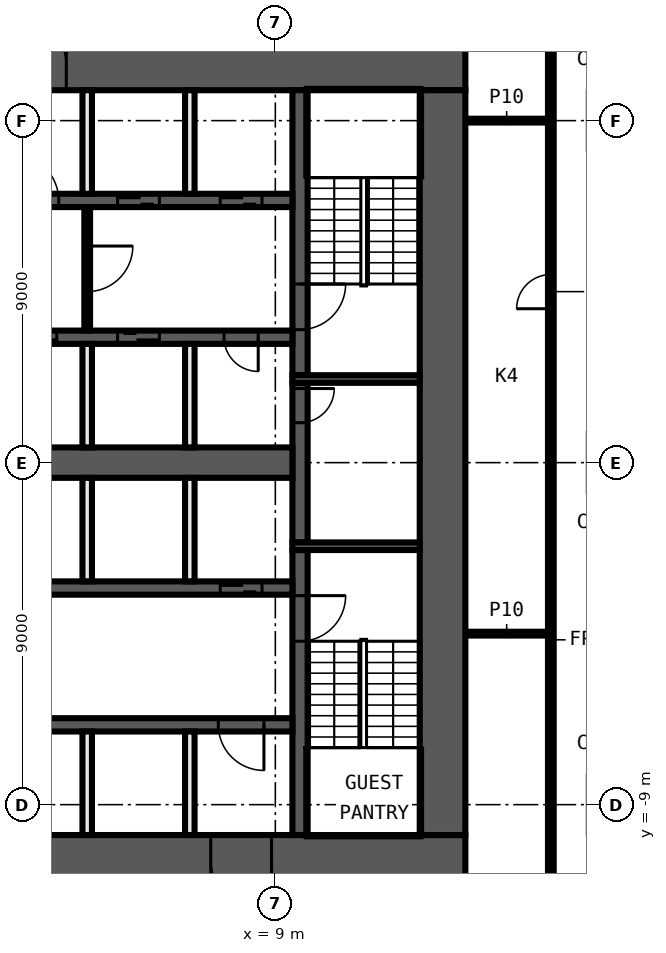
"""IFC4 building model, lengths in metres.
Left out: names, types, materials, properties, quantities, classifications, styles, units other than length and angle.
Written with IfcOpenShell. Run it as: python <this file> out.ifc"""

import sys

from ifc_helpers import new_model, si_unit, direction, frame, frame_2d, origin, place, context, subcontext, project, spatial, rectangle, extrude, element, fill, save


model = new_model("IFC4")
c1 = context("Model", 3, precision=1e-05, world=origin(), true_north=direction((0.0, 1.0)))
c2 = subcontext(c1, "Body", "Model", "MODEL_VIEW")
j1 = project(units=[si_unit("LENGTHUNIT", "METRE"), si_unit("PLANEANGLEUNIT", "RADIAN")], contexts=[c1])
p1 = place(None, origin())
s1 = spatial("IfcSite", under=j1, at=p1, CompositionType="ELEMENT")
p2 = place(p1, origin())
s2 = spatial("IfcBuilding", under=s1, at=p2, CompositionType="ELEMENT")
p3 = place(p2, frame((0.0, 0.0, 81.0)))
s3 = spatial("IfcBuildingStorey", under=s2, at=p3, CompositionType="ELEMENT", Elevation=81.0)
for number, where, z_axis, x_axis in (
    (1, (14.0, -4.5, 0.0), (0.0, 0.0, 1.0), (1.0, 0.0, 0.0)),
    (2, (14.0, 9.0, 0.0), (0.0, 0.0, 1.0), (1.0, 0.0, 0.0)),
):
    element("IfcWall", number, at=place(p3, frame(where, z_axis=z_axis, x_axis=x_axis)), inside=s3, PredefinedType="PARTITIONING", context=c2, shape_type="SweptSolid", body=[
        extrude(rectangle(XDim=2.175, YDim=0.1, at=frame_2d((1.087, 0.0))), origin(), (0.0, 0.0, 1.0), 3.3),
    ])
p4 = place(p3, frame((16.25, -13.175, 0.0), z_axis=(0.0, 0.0, 1.0), x_axis=(0.0, 1.0, 0.0)))
e3 = element("IfcWall", 3, at=p4, inside=s3, PredefinedType="PARTITIONING", context=c2, shape_type="SweptSolid", body=[
    extrude(rectangle(XDim=26.35, YDim=0.15, at=frame_2d((13.175, 0.0))), origin(), (0.0, 0.0, 1.0), 3.3),
])
p5 = place(p4, frame((17.225, 0.0, 0.0)))
e4 = element("IfcOpeningElement", 4, at=p5, cuts=e3, PredefinedType="OPENING", context=c2, shape_type="SweptSolid", body=[
    extrude(rectangle(XDim=0.9, YDim=2.1, at=frame_2d((0.45, 1.05))), frame((0.0, 0.085, 0.0), z_axis=(0.0, -1.0, 0.0), x_axis=(1.0, 0.0, 0.0)), (0.0, 0.0, 1.0), 0.17),
])
p6 = place(p3, frame((-14.0, 10.4, 0.0), z_axis=(0.0, 0.0, 1.0), x_axis=(1.0, 0.0, 0.0)))
e5 = element("IfcWall", 5, at=p6, inside=s3, PredefinedType="SHEAR", context=c2, shape_type="SweptSolid", body=[
    extrude(rectangle(XDim=28.0, YDim=1.2, at=frame_2d((14.0, 0.0))), origin(), (0.0, 0.0, 1.0), 3.3),
])
p7 = place(p6, frame((15.9, 0.0, 0.0)))
e6 = element("IfcOpeningElement", 6, at=p7, cuts=e5, PredefinedType="OPENING", context=c2, shape_type="SweptSolid", body=[
    extrude(rectangle(XDim=1.6, YDim=2.1, at=frame_2d((0.8, 1.05))), frame((0.0, 0.61, 0.0), z_axis=(0.0, -1.0, 0.0), x_axis=(1.0, 0.0, 0.0)), (0.0, 0.0, 1.0), 1.22),
])
p8 = place(p3, frame((14.0, -10.4, 0.0), z_axis=(0.0, 0.0, 1.0), x_axis=(-1.0, 0.0, 0.0)))
e7 = element("IfcWall", 7, at=p8, inside=s3, PredefinedType="SHEAR", context=c2, shape_type="SweptSolid", body=[
    extrude(rectangle(XDim=28.0, YDim=1.2, at=frame_2d((14.0, 0.0))), origin(), (0.0, 0.0, 1.0), 3.3),
])
p9 = place(p8, frame((5.1, 0.0, 0.0)))
e8 = element("IfcOpeningElement", 8, at=p9, cuts=e7, PredefinedType="OPENING", context=c2, shape_type="SweptSolid", body=[
    extrude(rectangle(XDim=1.6, YDim=2.1, at=frame_2d((0.8, 1.05))), frame((0.0, 0.61, 0.0), z_axis=(0.0, -1.0, 0.0), x_axis=(1.0, 0.0, 0.0)), (0.0, 0.0, 1.0), 1.22),
])
p10 = place(p3, frame((13.4, 9.8, 0.0), z_axis=(0.0, 0.0, 1.0), x_axis=(0.0, -1.0, 0.0)))
e9 = element("IfcWall", 9, at=p10, inside=s3, PredefinedType="SHEAR", context=c2, shape_type="SweptSolid", body=[
    extrude(rectangle(XDim=19.6, YDim=1.2, at=frame_2d((9.8, 0.0))), origin(), (0.0, 0.0, 1.0), 3.3),
])
p11 = place(p3, frame((9.65, -2.3, 0.0), z_axis=(0.0, 0.0, 1.0), x_axis=(0.0, -1.0, 0.0)))
e10 = element("IfcWall", 10, at=p11, inside=s3, PredefinedType="SHEAR", context=c2, shape_type="SweptSolid", body=[
    extrude(rectangle(XDim=7.5, YDim=0.4, at=frame_2d((3.75, 0.0))), origin(), (0.0, 0.0, 1.0), 3.3),
])
p12 = place(p11, frame((1.2, 0.0, 0.0)))
e11 = element("IfcOpeningElement", 11, at=p12, cuts=e10, PredefinedType="OPENING", context=c2, shape_type="SweptSolid", body=[
    extrude(rectangle(XDim=1.2, YDim=2.1, at=frame_2d((0.6, 1.05))), frame((0.0, 0.21, 0.0), z_axis=(0.0, -1.0, 0.0), x_axis=(1.0, 0.0, 0.0)), (0.0, 0.0, 1.0), 0.42),
])
p13 = place(p3, frame((9.65, 2.1, 0.0), z_axis=(0.0, 0.0, 1.0), x_axis=(0.0, -1.0, 0.0)))
e12 = element("IfcWall", 12, at=p13, inside=s3, PredefinedType="SHEAR", context=c2, shape_type="SweptSolid", body=[
    extrude(rectangle(XDim=4.2, YDim=0.4, at=frame_2d((2.1, 0.0))), origin(), (0.0, 0.0, 1.0), 3.3),
])
p14 = place(p13, frame((0.15, 0.0, 0.0)))
e13 = element("IfcOpeningElement", 13, at=p14, cuts=e12, PredefinedType="OPENING", context=c2, shape_type="SweptSolid", body=[
    extrude(rectangle(XDim=0.9, YDim=2.1, at=frame_2d((0.45, 1.05))), frame((0.0, 0.21, 0.0), z_axis=(0.0, -1.0, 0.0), x_axis=(1.0, 0.0, 0.0)), (0.0, 0.0, 1.0), 0.42),
])
p15 = place(p3, frame((9.65, 9.8, 0.0), z_axis=(0.0, 0.0, 1.0), x_axis=(0.0, -1.0, 0.0)))
e14 = element("IfcWall", 14, at=p15, inside=s3, PredefinedType="SHEAR", context=c2, shape_type="SweptSolid", body=[
    extrude(rectangle(XDim=7.5, YDim=0.4, at=frame_2d((3.75, 0.0))), origin(), (0.0, 0.0, 1.0), 3.3),
])
p16 = place(p15, frame((5.1, 0.0, 0.0)))
e15 = element("IfcOpeningElement", 15, at=p16, cuts=e14, PredefinedType="OPENING", context=c2, shape_type="SweptSolid", body=[
    extrude(rectangle(XDim=1.2, YDim=2.1, at=frame_2d((0.6, 1.05))), frame((0.0, 0.21, 0.0), z_axis=(0.0, -1.0, 0.0), x_axis=(1.0, 0.0, 0.0)), (0.0, 0.0, 1.0), 0.42),
])
for number, where, z_axis, x_axis in (
    (16, (9.45, 2.2, 0.0), (0.0, 0.0, 1.0), (1.0, 0.0, 0.0)),
    (17, (9.45, -2.2, 0.0), (0.0, 0.0, 1.0), (1.0, 0.0, 0.0)),
):
    element("IfcWall", number, at=place(p3, frame(where, z_axis=z_axis, x_axis=x_axis)), inside=s3, PredefinedType="SHEAR", context=c2, shape_type="SweptSolid", body=[
        extrude(rectangle(XDim=3.35, YDim=0.2, at=frame_2d((1.675, 0.0))), origin(), (0.0, 0.0, 1.0), 3.3),
    ])
p17 = place(p3, frame((-9.45, 6.9, 0.0), z_axis=(0.0, 0.0, 1.0), x_axis=(1.0, 0.0, 0.0)))
e18 = element("IfcWall", 18, at=p17, inside=s3, PredefinedType="SHEAR", context=c2, shape_type="SweptSolid", body=[
    extrude(rectangle(XDim=18.9, YDim=0.35, at=frame_2d((9.45, 0.0))), origin(), (0.0, 0.0, 1.0), 3.3),
])
p18 = place(p17, frame((0.8, 0.0, 0.0)))
e19 = element("IfcOpeningElement", 19, at=p18, cuts=e18, PredefinedType="OPENING", context=c2, shape_type="SweptSolid", body=[
    extrude(rectangle(XDim=1.1, YDim=2.1, at=frame_2d((0.55, 1.05))), frame((0.0, 0.185, 0.0), z_axis=(0.0, -1.0, 0.0), x_axis=(1.0, 0.0, 0.0)), (0.0, 0.0, 1.0), 0.37),
])
p19 = place(p17, frame((3.5, 0.0, 0.0)))
e20 = element("IfcOpeningElement", 20, at=p19, cuts=e18, PredefinedType="OPENING", context=c2, shape_type="SweptSolid", body=[
    extrude(rectangle(XDim=1.1, YDim=2.1, at=frame_2d((0.55, 1.05))), frame((0.0, 0.185, 0.0), z_axis=(0.0, -1.0, 0.0), x_axis=(1.0, 0.0, 0.0)), (0.0, 0.0, 1.0), 0.37),
])
p20 = place(p17, frame((6.2, 0.0, 0.0)))
e21 = element("IfcOpeningElement", 21, at=p20, cuts=e18, PredefinedType="OPENING", context=c2, shape_type="SweptSolid", body=[
    extrude(rectangle(XDim=1.1, YDim=2.1, at=frame_2d((0.55, 1.05))), frame((0.0, 0.185, 0.0), z_axis=(0.0, -1.0, 0.0), x_axis=(1.0, 0.0, 0.0)), (0.0, 0.0, 1.0), 0.37),
])
p21 = place(p17, frame((8.9, 0.0, 0.0)))
e22 = element("IfcOpeningElement", 22, at=p21, cuts=e18, PredefinedType="OPENING", context=c2, shape_type="SweptSolid", body=[
    extrude(rectangle(XDim=1.1, YDim=2.1, at=frame_2d((0.55, 1.05))), frame((0.0, 0.185, 0.0), z_axis=(0.0, -1.0, 0.0), x_axis=(1.0, 0.0, 0.0)), (0.0, 0.0, 1.0), 0.37),
])
p22 = place(p17, frame((11.55, 0.0, 0.0)))
e23 = element("IfcOpeningElement", 23, at=p22, cuts=e18, PredefinedType="OPENING", context=c2, shape_type="SweptSolid", body=[
    extrude(rectangle(XDim=1.2, YDim=2.1, at=frame_2d((0.6, 1.05))), frame((0.0, 0.185, 0.0), z_axis=(0.0, -1.0, 0.0), x_axis=(1.0, 0.0, 0.0)), (0.0, 0.0, 1.0), 0.37),
])
p23 = place(p17, frame((14.3, 0.0, 0.0)))
e24 = element("IfcOpeningElement", 24, at=p23, cuts=e18, PredefinedType="OPENING", context=c2, shape_type="SweptSolid", body=[
    extrude(rectangle(XDim=1.1, YDim=2.1, at=frame_2d((0.55, 1.05))), frame((0.0, 0.185, 0.0), z_axis=(0.0, -1.0, 0.0), x_axis=(1.0, 0.0, 0.0)), (0.0, 0.0, 1.0), 0.37),
])
p24 = place(p17, frame((17.0, 0.0, 0.0)))
e25 = element("IfcOpeningElement", 25, at=p24, cuts=e18, PredefinedType="OPENING", context=c2, shape_type="SweptSolid", body=[
    extrude(rectangle(XDim=1.1, YDim=2.1, at=frame_2d((0.55, 1.05))), frame((0.0, 0.185, 0.0), z_axis=(0.0, -1.0, 0.0), x_axis=(1.0, 0.0, 0.0)), (0.0, 0.0, 1.0), 0.37),
])
p25 = place(p3, frame((9.45, 3.3, 0.0), z_axis=(0.0, 0.0, 1.0), x_axis=(-1.0, 0.0, 0.0)))
e26 = element("IfcWall", 26, at=p25, inside=s3, PredefinedType="SHEAR", context=c2, shape_type="SweptSolid", body=[
    extrude(rectangle(XDim=18.9, YDim=0.35, at=frame_2d((9.45, 0.0))), origin(), (0.0, 0.0, 1.0), 3.3),
])
p26 = place(p25, frame((17.0, 0.0, 0.0)))
e27 = element("IfcOpeningElement", 27, at=p26, cuts=e26, PredefinedType="OPENING", context=c2, shape_type="SweptSolid", body=[
    extrude(rectangle(XDim=1.1, YDim=2.1, at=frame_2d((0.55, 1.05))), frame((0.0, 0.185, 0.0), z_axis=(0.0, -1.0, 0.0), x_axis=(1.0, 0.0, 0.0)), (0.0, 0.0, 1.0), 0.37),
])
p27 = place(p25, frame((14.3, 0.0, 0.0)))
e28 = element("IfcOpeningElement", 28, at=p27, cuts=e26, PredefinedType="OPENING", context=c2, shape_type="SweptSolid", body=[
    extrude(rectangle(XDim=1.1, YDim=2.1, at=frame_2d((0.55, 1.05))), frame((0.0, 0.185, 0.0), z_axis=(0.0, -1.0, 0.0), x_axis=(1.0, 0.0, 0.0)), (0.0, 0.0, 1.0), 0.37),
])
p28 = place(p25, frame((11.6, 0.0, 0.0)))
e29 = element("IfcOpeningElement", 29, at=p28, cuts=e26, PredefinedType="OPENING", context=c2, shape_type="SweptSolid", body=[
    extrude(rectangle(XDim=1.1, YDim=2.1, at=frame_2d((0.55, 1.05))), frame((0.0, 0.185, 0.0), z_axis=(0.0, -1.0, 0.0), x_axis=(1.0, 0.0, 0.0)), (0.0, 0.0, 1.0), 0.37),
])
p29 = place(p25, frame((8.9, 0.0, 0.0)))
e30 = element("IfcOpeningElement", 30, at=p29, cuts=e26, PredefinedType="OPENING", context=c2, shape_type="SweptSolid", body=[
    extrude(rectangle(XDim=1.1, YDim=2.1, at=frame_2d((0.55, 1.05))), frame((0.0, 0.185, 0.0), z_axis=(0.0, -1.0, 0.0), x_axis=(1.0, 0.0, 0.0)), (0.0, 0.0, 1.0), 0.37),
])
p30 = place(p25, frame((6.2, 0.0, 0.0)))
e31 = element("IfcOpeningElement", 31, at=p30, cuts=e26, PredefinedType="OPENING", context=c2, shape_type="SweptSolid", body=[
    extrude(rectangle(XDim=1.1, YDim=2.1, at=frame_2d((0.55, 1.05))), frame((0.0, 0.185, 0.0), z_axis=(0.0, -1.0, 0.0), x_axis=(1.0, 0.0, 0.0)), (0.0, 0.0, 1.0), 0.37),
])
p31 = place(p25, frame((3.5, 0.0, 0.0)))
e32 = element("IfcOpeningElement", 32, at=p31, cuts=e26, PredefinedType="OPENING", context=c2, shape_type="SweptSolid", body=[
    extrude(rectangle(XDim=1.1, YDim=2.1, at=frame_2d((0.55, 1.05))), frame((0.0, 0.185, 0.0), z_axis=(0.0, -1.0, 0.0), x_axis=(1.0, 0.0, 0.0)), (0.0, 0.0, 1.0), 0.37),
])
p32 = place(p25, frame((0.9, 0.0, 0.0)))
e33 = element("IfcOpeningElement", 33, at=p32, cuts=e26, PredefinedType="OPENING", context=c2, shape_type="SweptSolid", body=[
    extrude(rectangle(XDim=0.9, YDim=2.1, at=frame_2d((0.45, 1.05))), frame((0.0, 0.185, 0.0), z_axis=(0.0, -1.0, 0.0), x_axis=(1.0, 0.0, 0.0)), (0.0, 0.0, 1.0), 0.37),
])
p33 = place(p3, frame((-9.45, -3.3, 0.0), z_axis=(0.0, 0.0, 1.0), x_axis=(1.0, 0.0, 0.0)))
e34 = element("IfcWall", 34, at=p33, inside=s3, PredefinedType="SHEAR", context=c2, shape_type="SweptSolid", body=[
    extrude(rectangle(XDim=18.9, YDim=0.35, at=frame_2d((9.45, 0.0))), origin(), (0.0, 0.0, 1.0), 3.3),
])
p34 = place(p33, frame((17.0, 0.0, 0.0)))
e35 = element("IfcOpeningElement", 35, at=p34, cuts=e34, PredefinedType="OPENING", context=c2, shape_type="SweptSolid", body=[
    extrude(rectangle(XDim=1.1, YDim=2.1, at=frame_2d((0.55, 1.05))), frame((0.0, 0.185, 0.0), z_axis=(0.0, -1.0, 0.0), x_axis=(1.0, 0.0, 0.0)), (0.0, 0.0, 1.0), 0.37),
])
p35 = place(p33, frame((3.6, 0.0, 0.0)))
e36 = element("IfcOpeningElement", 36, at=p35, cuts=e34, PredefinedType="OPENING", context=c2, shape_type="SweptSolid", body=[
    extrude(rectangle(XDim=0.9, YDim=2.1, at=frame_2d((0.45, 1.05))), frame((0.0, 0.185, 0.0), z_axis=(0.0, -1.0, 0.0), x_axis=(1.0, 0.0, 0.0)), (0.0, 0.0, 1.0), 0.37),
])
p36 = place(p33, frame((9.0, 0.0, 0.0)))
e37 = element("IfcOpeningElement", 37, at=p36, cuts=e34, PredefinedType="OPENING", context=c2, shape_type="SweptSolid", body=[
    extrude(rectangle(XDim=0.9, YDim=2.1, at=frame_2d((0.45, 1.05))), frame((0.0, 0.185, 0.0), z_axis=(0.0, -1.0, 0.0), x_axis=(1.0, 0.0, 0.0)), (0.0, 0.0, 1.0), 0.37),
])
p37 = place(p3, frame((9.45, -6.9, 0.0), z_axis=(0.0, 0.0, 1.0), x_axis=(-1.0, 0.0, 0.0)))
e38 = element("IfcWall", 38, at=p37, inside=s3, PredefinedType="SHEAR", context=c2, shape_type="SweptSolid", body=[
    extrude(rectangle(XDim=18.9, YDim=0.35, at=frame_2d((9.45, 0.0))), origin(), (0.0, 0.0, 1.0), 3.3),
])
p38 = place(p37, frame((0.75, 0.0, 0.0)))
e39 = element("IfcOpeningElement", 39, at=p38, cuts=e38, PredefinedType="OPENING", context=c2, shape_type="SweptSolid", body=[
    extrude(rectangle(XDim=1.2, YDim=2.1, at=frame_2d((0.6, 1.05))), frame((0.0, 0.185, 0.0), z_axis=(0.0, -1.0, 0.0), x_axis=(1.0, 0.0, 0.0)), (0.0, 0.0, 1.0), 0.37),
])
p39 = place(p37, frame((14.4, 0.0, 0.0)))
e40 = element("IfcOpeningElement", 40, at=p39, cuts=e38, PredefinedType="OPENING", context=c2, shape_type="SweptSolid", body=[
    extrude(rectangle(XDim=0.9, YDim=2.1, at=frame_2d((0.45, 1.05))), frame((0.0, 0.185, 0.0), z_axis=(0.0, -1.0, 0.0), x_axis=(1.0, 0.0, 0.0)), (0.0, 0.0, 1.0), 0.37),
])
p40 = place(p37, frame((9.0, 0.0, 0.0)))
e41 = element("IfcOpeningElement", 41, at=p40, cuts=e38, PredefinedType="OPENING", context=c2, shape_type="SweptSolid", body=[
    extrude(rectangle(XDim=0.9, YDim=2.1, at=frame_2d((0.45, 1.05))), frame((0.0, 0.185, 0.0), z_axis=(0.0, -1.0, 0.0), x_axis=(1.0, 0.0, 0.0)), (0.0, 0.0, 1.0), 0.37),
])
p41 = place(p3, frame((-9.45, 0.0, 0.0), z_axis=(0.0, 0.0, 1.0), x_axis=(1.0, 0.0, 0.0)))
e42 = element("IfcWall", 42, at=p41, inside=s3, PredefinedType="SHEAR", context=c2, shape_type="SweptSolid", body=[
    extrude(rectangle(XDim=18.9, YDim=0.8, at=frame_2d((9.45, 0.0))), origin(), (0.0, 0.0, 1.0), 3.3),
])
for number, where, z_axis, x_axis in (
    (43, (6.75, -9.8, 0.0), (0.0, 0.0, 1.0), (0.0, 1.0, 0.0)),
    (44, (6.75, -3.125, 0.0), (0.0, 0.0, 1.0), (0.0, 1.0, 0.0)),
    (45, (6.75, 0.4, 0.0), (0.0, 0.0, 1.0), (0.0, 1.0, 0.0)),
    (46, (6.75, 7.075, 0.0), (0.0, 0.0, 1.0), (0.0, 1.0, 0.0)),
):
    element("IfcWall", number, at=place(p3, frame(where, z_axis=z_axis, x_axis=x_axis)), inside=s3, PredefinedType="SOLIDWALL", context=c2, shape_type="SweptSolid", body=[
        extrude(rectangle(XDim=2.725, YDim=0.25, at=frame_2d((1.363, 0.0))), origin(), (0.0, 0.0, 1.0), 3.3),
    ])
p42 = place(p3, frame((4.05, 6.725, 0.0), z_axis=(0.0, 0.0, 1.0), x_axis=(0.0, -1.0, 0.0)))
e47 = element("IfcWall", 47, at=p42, inside=s3, PredefinedType="PARTITIONING", context=c2, shape_type="SweptSolid", body=[
    extrude(rectangle(XDim=3.25, YDim=0.15, at=frame_2d((1.625, 0.0))), origin(), (0.0, 0.0, 1.0), 3.3),
])
p43 = place(p42, frame((1.025, 0.0, 0.0)))
e48 = element("IfcOpeningElement", 48, at=p43, cuts=e47, PredefinedType="OPENING", context=c2, shape_type="SweptSolid", body=[
    extrude(rectangle(XDim=1.2, YDim=2.1, at=frame_2d((0.6, 1.05))), frame((0.0, 0.085, 0.0), z_axis=(0.0, -1.0, 0.0), x_axis=(1.0, 0.0, 0.0)), (0.0, 0.0, 1.0), 0.17),
])
for number, where, z_axis, x_axis in (
    (49, (4.05, -9.8, 0.0), (0.0, 0.0, 1.0), (0.0, 1.0, 0.0)),
    (50, (4.05, -3.125, 0.0), (0.0, 0.0, 1.0), (0.0, 1.0, 0.0)),
    (51, (4.05, 0.4, 0.0), (0.0, 0.0, 1.0), (0.0, 1.0, 0.0)),
    (52, (4.05, 7.075, 0.0), (0.0, 0.0, 1.0), (0.0, 1.0, 0.0)),
):
    element("IfcWall", number, at=place(p3, frame(where, z_axis=z_axis, x_axis=x_axis)), inside=s3, PredefinedType="SOLIDWALL", context=c2, shape_type="SweptSolid", body=[
        extrude(rectangle(XDim=2.725, YDim=0.25, at=frame_2d((1.363, 0.0))), origin(), (0.0, 0.0, 1.0), 3.3),
    ])
p44 = place(p5, origin())
e53 = element("IfcDoor", 53, at=p44, inside=s3, OperationType="SINGLE_SWING_LEFT", PredefinedType="DOOR", context=c2, shape_type="SweptSolid", body=[
    extrude(rectangle(XDim=0.9, YDim=2.1, at=frame_2d((0.45, 1.05))), frame((0.0, 0.025, 0.0), z_axis=(0.0, -1.0, 0.0), x_axis=(1.0, 0.0, 0.0)), (0.0, 0.0, 1.0), 0.05),
])
fill(e4, e53)
p45 = place(p14, origin())
e54 = element("IfcDoor", 54, at=p45, inside=s3, OperationType="SINGLE_SWING_RIGHT", PredefinedType="DOOR", context=c2, shape_type="SweptSolid", body=[
    extrude(rectangle(XDim=0.9, YDim=2.1, at=frame_2d((0.45, 1.05))), frame((0.0, 0.025, 0.0), z_axis=(0.0, -1.0, 0.0), x_axis=(1.0, 0.0, 0.0)), (0.0, 0.0, 1.0), 0.05),
])
fill(e13, e54)
p46 = place(p7, origin())
e55 = element("IfcDoor", 55, at=p46, inside=s3, OperationType="DOUBLE_DOOR_SINGLE_SWING", PredefinedType="DOOR", context=c2, shape_type="SweptSolid", body=[
    extrude(rectangle(XDim=1.6, YDim=2.1, at=frame_2d((0.8, 1.05))), frame((0.0, 0.025, 0.0), z_axis=(0.0, -1.0, 0.0), x_axis=(1.0, 0.0, 0.0)), (0.0, 0.0, 1.0), 0.05),
])
fill(e6, e55)
p47 = place(p22, origin())
e56 = element("IfcDoor", 56, at=p47, inside=s3, OperationType="SINGLE_SWING_LEFT", PredefinedType="DOOR", context=c2, shape_type="SweptSolid", body=[
    extrude(rectangle(XDim=1.2, YDim=2.1, at=frame_2d((0.6, 1.05))), frame((0.0, 0.025, 0.0), z_axis=(0.0, -1.0, 0.0), x_axis=(1.0, 0.0, 0.0)), (0.0, 0.0, 1.0), 0.05),
])
fill(e23, e56)
p48 = place(p23, origin())
e57 = element("IfcDoor", 57, at=p48, inside=s3, OperationType="DOUBLE_DOOR_SLIDING", PredefinedType="DOOR", context=c2, shape_type="SweptSolid", body=[
    extrude(rectangle(XDim=1.1, YDim=2.1, at=frame_2d((0.55, 1.05))), frame((0.0, 0.025, 0.0), z_axis=(0.0, -1.0, 0.0), x_axis=(1.0, 0.0, 0.0)), (0.0, 0.0, 1.0), 0.05),
])
fill(e24, e57)
p49 = place(p24, origin())
e58 = element("IfcDoor", 58, at=p49, inside=s3, OperationType="DOUBLE_DOOR_SLIDING", PredefinedType="DOOR", context=c2, shape_type="SweptSolid", body=[
    extrude(rectangle(XDim=1.1, YDim=2.1, at=frame_2d((0.55, 1.05))), frame((0.0, 0.025, 0.0), z_axis=(0.0, -1.0, 0.0), x_axis=(1.0, 0.0, 0.0)), (0.0, 0.0, 1.0), 0.05),
])
fill(e25, e58)
p50 = place(p30, origin())
e59 = element("IfcDoor", 59, at=p50, inside=s3, OperationType="DOUBLE_DOOR_SLIDING", PredefinedType="DOOR", context=c2, shape_type="SweptSolid", body=[
    extrude(rectangle(XDim=1.1, YDim=2.1, at=frame_2d((0.55, 1.05))), frame((0.0, 0.025, 0.0), z_axis=(0.0, -1.0, 0.0), x_axis=(1.0, 0.0, 0.0)), (0.0, 0.0, 1.0), 0.05),
])
fill(e31, e59)
p51 = place(p31, origin())
e60 = element("IfcDoor", 60, at=p51, inside=s3, OperationType="DOUBLE_DOOR_SLIDING", PredefinedType="DOOR", context=c2, shape_type="SweptSolid", body=[
    extrude(rectangle(XDim=1.1, YDim=2.1, at=frame_2d((0.55, 1.05))), frame((0.0, 0.025, 0.0), z_axis=(0.0, -1.0, 0.0), x_axis=(1.0, 0.0, 0.0)), (0.0, 0.0, 1.0), 0.05),
])
fill(e32, e60)
p52 = place(p32, origin())
e61 = element("IfcDoor", 61, at=p52, inside=s3, OperationType="SINGLE_SWING_LEFT", PredefinedType="DOOR", context=c2, shape_type="SweptSolid", body=[
    extrude(rectangle(XDim=0.9, YDim=2.1, at=frame_2d((0.45, 1.05))), frame((0.0, 0.025, 0.0), z_axis=(0.0, -1.0, 0.0), x_axis=(1.0, 0.0, 0.0)), (0.0, 0.0, 1.0), 0.05),
])
fill(e33, e61)
p53 = place(p34, origin())
e62 = element("IfcDoor", 62, at=p53, inside=s3, OperationType="DOUBLE_DOOR_SLIDING", PredefinedType="DOOR", context=c2, shape_type="SweptSolid", body=[
    extrude(rectangle(XDim=1.1, YDim=2.1, at=frame_2d((0.55, 1.05))), frame((0.0, 0.025, 0.0), z_axis=(0.0, -1.0, 0.0), x_axis=(1.0, 0.0, 0.0)), (0.0, 0.0, 1.0), 0.05),
])
fill(e35, e62)
p54 = place(p9, origin())
e63 = element("IfcDoor", 63, at=p54, inside=s3, OperationType="DOUBLE_DOOR_SINGLE_SWING", PredefinedType="DOOR", context=c2, shape_type="SweptSolid", body=[
    extrude(rectangle(XDim=1.6, YDim=2.1, at=frame_2d((0.8, 1.05))), frame((0.0, 0.025, 0.0), z_axis=(0.0, -1.0, 0.0), x_axis=(1.0, 0.0, 0.0)), (0.0, 0.0, 1.0), 0.05),
])
fill(e8, e63)
p55 = place(p38, origin())
e64 = element("IfcDoor", 64, at=p55, inside=s3, OperationType="SINGLE_SWING_LEFT", PredefinedType="DOOR", context=c2, shape_type="SweptSolid", body=[
    extrude(rectangle(XDim=1.2, YDim=2.1, at=frame_2d((0.6, 1.05))), frame((0.0, 0.025, 0.0), z_axis=(0.0, -1.0, 0.0), x_axis=(1.0, 0.0, 0.0)), (0.0, 0.0, 1.0), 0.05),
])
fill(e39, e64)
p56 = place(p16, origin())
e65 = element("IfcDoor", 65, at=p56, inside=s3, OperationType="SINGLE_SWING_LEFT", PredefinedType="DOOR", context=c2, shape_type="SweptSolid", body=[
    extrude(rectangle(XDim=1.2, YDim=2.1, at=frame_2d((0.6, 1.05))), frame((0.0, 0.025, 0.0), z_axis=(0.0, -1.0, 0.0), x_axis=(1.0, 0.0, 0.0)), (0.0, 0.0, 1.0), 0.05),
])
fill(e15, e65)
p57 = place(p12, origin())
e66 = element("IfcDoor", 66, at=p57, inside=s3, OperationType="SINGLE_SWING_RIGHT", PredefinedType="DOOR", context=c2, shape_type="SweptSolid", body=[
    extrude(rectangle(XDim=1.2, YDim=2.1, at=frame_2d((0.6, 1.05))), frame((0.0, 0.025, 0.0), z_axis=(0.0, -1.0, 0.0), x_axis=(1.0, 0.0, 0.0)), (0.0, 0.0, 1.0), 0.05),
])
fill(e11, e66)
p58 = place(p43, origin())
e67 = element("IfcDoor", 67, at=p58, inside=s3, OperationType="SINGLE_SWING_RIGHT", PredefinedType="DOOR", context=c2, shape_type="SweptSolid", body=[
    extrude(rectangle(XDim=1.2, YDim=2.1, at=frame_2d((0.6, 1.05))), frame((0.0, 0.025, 0.0), z_axis=(0.0, -1.0, 0.0), x_axis=(1.0, 0.0, 0.0)), (0.0, 0.0, 1.0), 0.05),
])
fill(e48, e67)
save(model, sys.argv[1])
